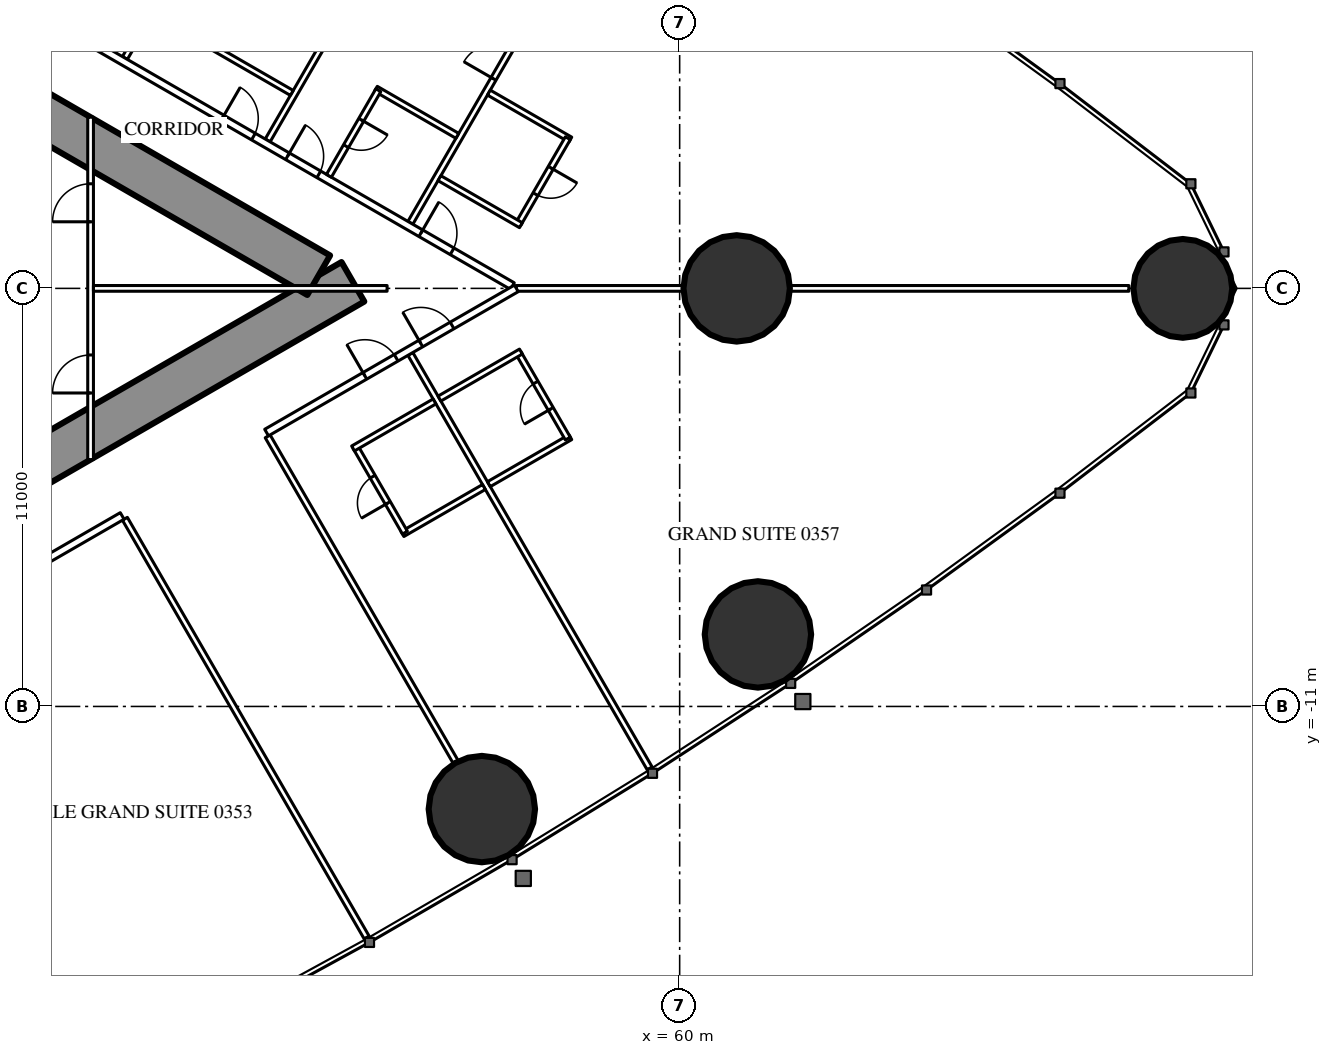
"""IFC4 building model, lengths in metres.
Left out: names, types, materials, properties, quantities, classifications, styles, units other than length and angle.
Written with IfcOpenShell. Run it as: python <this file> out.ifc"""

import sys

from ifc_helpers import new_model, si_unit, direction, frame, frame_2d, origin, origin_2d, place, context, subcontext, project, spatial, rectangle, hollow_circle, extrude, element, fill, save


model = new_model("IFC4")
c1 = context("Model", 3, precision=1e-05, world=origin(), true_north=direction((0.0, 1.0)))
c2 = subcontext(c1, "Body", "Model", "MODEL_VIEW")
j1 = project(units=[si_unit("LENGTHUNIT", "METRE"), si_unit("PLANEANGLEUNIT", "RADIAN")], contexts=[c1])
p1 = place(None, origin())
s1 = spatial("IfcSite", under=j1, at=p1, CompositionType="ELEMENT")
p2 = place(p1, origin())
s2 = spatial("IfcBuilding", under=s1, at=p2, CompositionType="ELEMENT")
p3 = place(p2, frame((0.0, 0.0, 18.0)))
s3 = spatial("IfcBuildingStorey", under=s2, at=p3, CompositionType="ELEMENT", Elevation=18.0)
p4 = place(p3, frame((73.239, 0.0, 0.0), z_axis=(0.0, 0.0, 1.0), x_axis=(1.0, 0.0, 0.0)))
e1 = element("IfcColumn", 1, at=p4, inside=s3, PredefinedType="COLUMN", context=c2, shape_type="SweptSolid", body=[
    extrude(hollow_circle(Radius=1.3, WallThickness=0.1, at=origin_2d()), origin(), (0.0, 0.0, 1.0), 3.5),
])
for number, where, z_axis, x_axis in (
    (2, (54.795, -13.701, 0.0), (0.0, 0.0, 1.0), (1.0, 0.0, 0.0)),
    (3, (62.059, -9.105, 0.0), (0.0, 0.0, 1.0), (1.0, 0.0, 0.0)),
):
    element("IfcColumn", number, at=place(p3, frame(where, z_axis=z_axis, x_axis=x_axis)), inside=s3, PredefinedType="COLUMN", context=c2, shape_type="SweptSolid", body=[
        extrude(hollow_circle(Radius=1.4, WallThickness=0.12, at=origin_2d()), origin(), (0.0, 0.0, 1.0), 3.5),
    ])
p5 = place(p3, frame((61.5, 0.0, 0.0), z_axis=(0.0, 0.0, 1.0), x_axis=(1.0, 0.0, 0.0)))
e4 = element("IfcColumn", 4, at=p5, inside=s3, PredefinedType="COLUMN", context=c2, shape_type="SweptSolid", body=[
    extrude(hollow_circle(Radius=1.4, WallThickness=0.1, at=origin_2d()), origin(), (0.0, 0.0, 1.0), 3.5),
])
p6 = place(p3, frame((27.2, -13.8, 0.0), z_axis=(0.0, 0.0, 1.0), x_axis=(0.866027159892, 0.499996958321, 0.0)))
e5 = element("IfcWall", 5, at=p6, inside=s3, PredefinedType="SHEAR", context=c2, shape_type="SweptSolid", body=[
    extrude(rectangle(XDim=27.947, YDim=1.2, at=frame_2d((13.973, 0.0))), origin(), (0.0, 0.0, 1.0), 3.5),
])
p7 = place(p6, frame((4.6, 0.0, 0.0)))
e6 = element("IfcOpeningElement", 6, at=p7, cuts=e5, PredefinedType="OPENING", context=c2, shape_type="SweptSolid", body=[
    extrude(rectangle(XDim=1.0, YDim=2.2, at=frame_2d((0.5, 1.1))), frame((0.0, 0.61, 0.0), z_axis=(0.0, -1.0, 0.0), x_axis=(1.0, 0.0, 0.0)), (0.0, 0.0, 1.0), 1.22),
])
p8 = place(p6, frame((13.395, 0.0, 0.0)))
e7 = element("IfcOpeningElement", 7, at=p8, cuts=e5, PredefinedType="OPENING", context=c2, shape_type="SweptSolid", body=[
    extrude(rectangle(XDim=1.8, YDim=2.2, at=frame_2d((0.9, 1.1))), frame((0.0, 0.61, 0.0), z_axis=(0.0, -1.0, 0.0), x_axis=(1.0, 0.0, 0.0)), (0.0, 0.0, 1.0), 1.22),
])
p9 = place(p3, frame((27.2, 13.8, 0.0), z_axis=(0.0, 0.0, 1.0), x_axis=(0.866024515034, -0.500001539357, 0.0)))
e8 = element("IfcWall", 8, at=p9, inside=s3, PredefinedType="SHEAR", context=c2, shape_type="SweptSolid", body=[
    extrude(rectangle(XDim=26.907, YDim=1.2, at=frame_2d((13.454, 0.0))), origin(), (0.0, 0.0, 1.0), 3.5),
])
p10 = place(p9, frame((4.6, 0.0, 0.0)))
e9 = element("IfcOpeningElement", 9, at=p10, cuts=e8, PredefinedType="OPENING", context=c2, shape_type="SweptSolid", body=[
    extrude(rectangle(XDim=1.0, YDim=2.2, at=frame_2d((0.5, 1.1))), frame((0.0, 0.61, 0.0), z_axis=(0.0, -1.0, 0.0), x_axis=(1.0, 0.0, 0.0)), (0.0, 0.0, 1.0), 1.22),
])
p11 = place(p9, frame((13.395, 0.0, 0.0)))
e10 = element("IfcOpeningElement", 10, at=p11, cuts=e8, PredefinedType="OPENING", context=c2, shape_type="SweptSolid", body=[
    extrude(rectangle(XDim=1.8, YDim=2.2, at=frame_2d((0.9, 1.1))), frame((0.0, 0.61, 0.0), z_axis=(0.0, -1.0, 0.0), x_axis=(1.0, 0.0, 0.0)), (0.0, 0.0, 1.0), 1.22),
])
p12 = place(p3, frame((45.403, -6.062, 0.0), z_axis=(0.0, 0.0, 1.0), x_axis=(0.500007077968, -0.866021317279, 0.0)))
e11 = element("IfcWall", 11, at=p12, inside=s3, PredefinedType="PARTITIONING", context=c2, shape_type="SweptSolid", body=[
    extrude(rectangle(XDim=12.721, YDim=0.15, at=frame_2d((6.361, 0.0))), origin(), (0.0, 0.0, 1.0), 3.25),
])
p13 = place(p3, frame((49.159, -3.893, 0.0), z_axis=(0.0, 0.0, 1.0), x_axis=(0.499998773722, -0.866026111775, 0.0)))
e12 = element("IfcWall", 12, at=p13, inside=s3, PredefinedType="PARTITIONING", context=c2, shape_type="SweptSolid", body=[
    extrude(rectangle(XDim=9.892, YDim=0.15, at=frame_2d((4.946, 0.0))), origin(), (0.0, 0.0, 1.0), 2.25),
])
p14 = place(p3, frame((52.915, -1.725, 0.0), z_axis=(0.0, 0.0, 1.0), x_axis=(0.499997163113, -0.866027041656, 0.0)))
e13 = element("IfcWall", 13, at=p14, inside=s3, PredefinedType="PARTITIONING", context=c2, shape_type="SweptSolid", body=[
    extrude(rectangle(XDim=12.591, YDim=0.15, at=frame_2d((6.295, 0.0))), origin(), (0.0, 0.0, 1.0), 3.25),
])
p15 = place(p3, frame((45.403, 6.062, 0.0), z_axis=(0.0, 0.0, 1.0), x_axis=(0.500013434677, 0.866017647131, 0.0)))
e14 = element("IfcWall", 14, at=p15, inside=s3, PredefinedType="PARTITIONING", context=c2, shape_type="SweptSolid", body=[
    extrude(rectangle(XDim=9.902, YDim=0.15, at=frame_2d((4.951, 0.0))), origin(), (0.0, 0.0, 1.0), 2.25),
])
p16 = place(p3, frame((49.159, 3.893, 0.0), z_axis=(0.0, 0.0, 1.0), x_axis=(0.499995664361, 0.866027906952, 0.0)))
e15 = element("IfcWall", 15, at=p16, inside=s3, PredefinedType="PARTITIONING", context=c2, shape_type="SweptSolid", body=[
    extrude(rectangle(XDim=12.711, YDim=0.15, at=frame_2d((6.356, 0.0))), origin(), (0.0, 0.0, 1.0), 3.25),
])
p17 = place(p3, frame((52.915, 1.725, 0.0), z_axis=(0.0, 0.0, 1.0), x_axis=(0.499997163113, 0.866027041656, 0.0)))
e16 = element("IfcWall", 16, at=p17, inside=s3, PredefinedType="PARTITIONING", context=c2, shape_type="SweptSolid", body=[
    extrude(rectangle(XDim=12.591, YDim=0.15, at=frame_2d((6.295, 0.0))), origin(), (0.0, 0.0, 1.0), 3.25),
])
p18 = place(p17, frame((4.375, 0.0, 0.0)))
e17 = element("IfcOpeningElement", 17, at=p18, cuts=e16, PredefinedType="OPENING", context=c2, shape_type="SweptSolid", body=[
    extrude(rectangle(XDim=0.9, YDim=2.2, at=frame_2d((0.45, 1.1))), frame((0.0, 0.085, 0.0), z_axis=(0.0, -1.0, 0.0), x_axis=(1.0, 0.0, 0.0)), (0.0, 0.0, 1.0), 0.17),
])
p19 = place(p3, frame((55.702, 0.0, 0.0), z_axis=(0.0, 0.0, 1.0), x_axis=(1.0, 0.0, 0.0)))
e18 = element("IfcWall", 18, at=p19, inside=s3, PredefinedType="PARTITIONING", context=c2, shape_type="SweptSolid", body=[
    extrude(rectangle(XDim=16.117, YDim=0.15, at=frame_2d((8.059, 0.0))), origin(), (0.0, 0.0, 1.0), 2.25),
])
p20 = place(p3, frame((36.834, 10.894, 0.0), z_axis=(0.0, 0.0, 1.0), x_axis=(0.866028157229, -0.499995230863, 0.0)))
e19 = element("IfcWall", 19, at=p20, inside=s3, PredefinedType="PARTITIONING", context=c2, shape_type="SweptSolid", body=[
    extrude(rectangle(XDim=21.667, YDim=0.2, at=frame_2d((10.833, 0.0))), origin(), (0.0, 0.0, 1.0), 3.25),
])
p21 = place(p20, frame((18.885, 0.0, 0.0)))
e20 = element("IfcOpeningElement", 20, at=p21, cuts=e19, PredefinedType="OPENING", context=c2, shape_type="SweptSolid", body=[
    extrude(rectangle(XDim=0.95, YDim=2.2, at=frame_2d((0.475, 1.1))), frame((0.0, 0.11, 0.0), z_axis=(0.0, -1.0, 0.0), x_axis=(1.0, 0.0, 0.0)), (0.0, 0.0, 1.0), 0.22),
])
p22 = place(p20, frame((14.835, 0.0, 0.0)))
e21 = element("IfcOpeningElement", 21, at=p22, cuts=e19, PredefinedType="OPENING", context=c2, shape_type="SweptSolid", body=[
    extrude(rectangle(XDim=0.95, YDim=2.2, at=frame_2d((0.475, 1.1))), frame((0.0, 0.11, 0.0), z_axis=(0.0, -1.0, 0.0), x_axis=(1.0, 0.0, 0.0)), (0.0, 0.0, 1.0), 0.22),
])
p23 = place(p20, frame((12.85, 0.0, 0.0)))
e22 = element("IfcOpeningElement", 22, at=p23, cuts=e19, PredefinedType="OPENING", context=c2, shape_type="SweptSolid", body=[
    extrude(rectangle(XDim=0.95, YDim=2.2, at=frame_2d((0.475, 1.1))), frame((0.0, 0.11, 0.0), z_axis=(0.0, -1.0, 0.0), x_axis=(1.0, 0.0, 0.0)), (0.0, 0.0, 1.0), 0.22),
])
p24 = place(p20, frame((1.542, 0.0, 0.0)))
e23 = element("IfcOpeningElement", 23, at=p24, cuts=e19, PredefinedType="OPENING", context=c2, shape_type="SweptSolid", body=[
    extrude(rectangle(XDim=0.95, YDim=2.2, at=frame_2d((0.475, 1.1))), frame((0.0, 0.11, 0.0), z_axis=(0.0, -1.0, 0.0), x_axis=(1.0, 0.0, 0.0)), (0.0, 0.0, 1.0), 0.22),
])
p25 = place(p3, frame((37.96, -10.243, 0.0), z_axis=(0.0, 0.0, 1.0), x_axis=(0.866024617314, 0.500001362204, 0.0)))
e24 = element("IfcWall", 24, at=p25, inside=s3, PredefinedType="PARTITIONING", context=c2, shape_type="SweptSolid", body=[
    extrude(rectangle(XDim=8.512, YDim=0.2, at=frame_2d((4.256, 0.0))), origin(), (0.0, 0.0, 1.0), 3.25),
])
p26 = place(p25, frame((3.35, 0.0, 0.0)))
e25 = element("IfcOpeningElement", 25, at=p26, cuts=e24, PredefinedType="OPENING", context=c2, shape_type="SweptSolid", body=[
    extrude(rectangle(XDim=1.0, YDim=2.2, at=frame_2d((0.5, 1.1))), frame((0.0, 0.11, 0.0), z_axis=(0.0, -1.0, 0.0), x_axis=(1.0, 0.0, 0.0)), (0.0, 0.0, 1.0), 0.22),
])
p27 = place(p3, frame((49.131, -3.794, 0.0), z_axis=(0.0, 0.0, 1.0), x_axis=(0.866030732979, 0.499990769451, 0.0)))
e26 = element("IfcWall", 26, at=p27, inside=s3, PredefinedType="PARTITIONING", context=c2, shape_type="SweptSolid", body=[
    extrude(rectangle(XDim=7.588, YDim=0.2, at=frame_2d((3.794, 0.0))), origin(), (0.0, 0.0, 1.0), 3.25),
])
p28 = place(p27, frame((2.986, 0.0, 0.0)))
e27 = element("IfcOpeningElement", 27, at=p28, cuts=e26, PredefinedType="OPENING", context=c2, shape_type="SweptSolid", body=[
    extrude(rectangle(XDim=0.95, YDim=2.2, at=frame_2d((0.475, 1.1))), frame((0.0, 0.11, 0.0), z_axis=(0.0, -1.0, 0.0), x_axis=(1.0, 0.0, 0.0)), (0.0, 0.0, 1.0), 0.22),
])
p29 = place(p27, frame((4.686, 0.0, 0.0)))
e28 = element("IfcOpeningElement", 28, at=p29, cuts=e26, PredefinedType="OPENING", context=c2, shape_type="SweptSolid", body=[
    extrude(rectangle(XDim=0.95, YDim=2.2, at=frame_2d((0.475, 1.1))), frame((0.0, 0.11, 0.0), z_axis=(0.0, -1.0, 0.0), x_axis=(1.0, 0.0, 0.0)), (0.0, 0.0, 1.0), 0.22),
])
p30 = place(p3, frame((52.706, -6.464, 0.0), z_axis=(0.0, 0.0, 1.0), x_axis=(0.86604923931, 0.499958713387, 0.0)))
e29 = element("IfcWall", 29, at=p30, inside=s3, PredefinedType="PARTITIONING", context=c2, shape_type="SweptSolid", body=[
    extrude(rectangle(XDim=2.475, YDim=0.15, at=frame_2d((1.237, 0.0))), origin(), (0.0, 0.0, 1.0), 3.25),
])
p31 = place(p3, frame((51.471, -4.175, 0.0), z_axis=(0.0, 0.0, 1.0), x_axis=(0.500006934395, -0.866021400173, 0.0)))
e30 = element("IfcWall", 30, at=p31, inside=s3, PredefinedType="PARTITIONING", context=c2, shape_type="SweptSolid", body=[
    extrude(rectangle(XDim=2.6, YDim=0.15, at=frame_2d((1.3, 0.0))), origin(), (0.0, 0.0, 1.0), 3.25),
])
p32 = place(p31, frame((0.9, 0.0, 0.0)))
e31 = element("IfcOpeningElement", 31, at=p32, cuts=e30, PredefinedType="OPENING", context=c2, shape_type="SweptSolid", body=[
    extrude(rectangle(XDim=0.8, YDim=2.2, at=frame_2d((0.4, 1.1))), frame((0.0, 0.085, 0.0), z_axis=(0.0, -1.0, 0.0), x_axis=(1.0, 0.0, 0.0)), (0.0, 0.0, 1.0), 0.17),
])
p33 = place(p3, frame((51.406, -4.212, 0.0), z_axis=(0.0, 0.0, 1.0), x_axis=(0.866031185235, 0.4999899861, 0.0)))
e32 = element("IfcWall", 32, at=p33, inside=s3, PredefinedType="PARTITIONING", context=c2, shape_type="SweptSolid", body=[
    extrude(rectangle(XDim=2.475, YDim=0.15, at=frame_2d((1.238, 0.0))), origin(), (0.0, 0.0, 1.0), 3.25),
])
p34 = place(p3, frame((54.98, -5.151, 0.0), z_axis=(0.0, 0.0, 1.0), x_axis=(0.86604923931, 0.499958713387, 0.0)))
e33 = element("IfcWall", 33, at=p34, inside=s3, PredefinedType="PARTITIONING", context=c2, shape_type="SweptSolid", body=[
    extrude(rectangle(XDim=2.475, YDim=0.15, at=frame_2d((1.237, 0.0))), origin(), (0.0, 0.0, 1.0), 3.25),
])
p35 = place(p3, frame((55.758, -1.7, 0.0), z_axis=(0.0, 0.0, 1.0), x_axis=(0.500006934395, -0.866021400173, 0.0)))
e34 = element("IfcWall", 34, at=p35, inside=s3, PredefinedType="PARTITIONING", context=c2, shape_type="SweptSolid", body=[
    extrude(rectangle(XDim=2.6, YDim=0.15, at=frame_2d((1.3, 0.0))), origin(), (0.0, 0.0, 1.0), 3.25),
])
p36 = place(p35, frame((0.9, 0.0, 0.0)))
e35 = element("IfcOpeningElement", 35, at=p36, cuts=e34, PredefinedType="OPENING", context=c2, shape_type="SweptSolid", body=[
    extrude(rectangle(XDim=0.8, YDim=2.2, at=frame_2d((0.4, 1.1))), frame((0.0, 0.085, 0.0), z_axis=(0.0, -1.0, 0.0), x_axis=(1.0, 0.0, 0.0)), (0.0, 0.0, 1.0), 0.17),
])
for number, where, z_axis, x_axis in (
    (36, (53.68, -2.9, 0.0), (0.0, 0.0, 1.0), (0.866, 0.5, 0.0)),
    (37, (54.98, 5.151, 0.0), (0.0, 0.0, 1.0), (0.866, -0.5, 0.0)),
):
    element("IfcWall", number, at=place(p3, frame(where, z_axis=z_axis, x_axis=x_axis)), inside=s3, PredefinedType="PARTITIONING", context=c2, shape_type="SweptSolid", body=[
        extrude(rectangle(XDim=2.475, YDim=0.15, at=frame_2d((1.237, 0.0))), origin(), (0.0, 0.0, 1.0), 3.25),
    ])
p37 = place(p3, frame((55.758, 1.7, 0.0), z_axis=(0.0, 0.0, 1.0), x_axis=(0.500006934395, 0.866021400173, 0.0)))
e38 = element("IfcWall", 38, at=p37, inside=s3, PredefinedType="PARTITIONING", context=c2, shape_type="SweptSolid", body=[
    extrude(rectangle(XDim=2.6, YDim=0.15, at=frame_2d((1.3, 0.0))), origin(), (0.0, 0.0, 1.0), 3.25),
])
p38 = place(p37, frame((0.9, 0.0, 0.0)))
e39 = element("IfcOpeningElement", 39, at=p38, cuts=e38, PredefinedType="OPENING", context=c2, shape_type="SweptSolid", body=[
    extrude(rectangle(XDim=0.8, YDim=2.2, at=frame_2d((0.4, 1.1))), frame((0.0, 0.085, 0.0), z_axis=(0.0, -1.0, 0.0), x_axis=(1.0, 0.0, 0.0)), (0.0, 0.0, 1.0), 0.17),
])
for number, where, z_axis, x_axis in (
    (40, (53.68, 2.9, 0.0), (0.0, 0.0, 1.0), (0.866, -0.5, 0.0)),
    (41, (52.006, 5.251, 0.0), (0.0, 0.0, 1.0), (0.866, -0.5, 0.0)),
):
    element("IfcWall", number, at=place(p3, frame(where, z_axis=z_axis, x_axis=x_axis)), inside=s3, PredefinedType="PARTITIONING", context=c2, shape_type="SweptSolid", body=[
        extrude(rectangle(XDim=2.475, YDim=0.15, at=frame_2d((1.237, 0.0))), origin(), (0.0, 0.0, 1.0), 3.25),
    ])
p39 = place(p3, frame((50.771, 2.962, 0.0), z_axis=(0.0, 0.0, 1.0), x_axis=(0.500006934395, 0.866021400173, 0.0)))
e42 = element("IfcWall", 42, at=p39, inside=s3, PredefinedType="PARTITIONING", context=c2, shape_type="SweptSolid", body=[
    extrude(rectangle(XDim=2.6, YDim=0.15, at=frame_2d((1.3, 0.0))), origin(), (0.0, 0.0, 1.0), 3.25),
])
p40 = place(p39, frame((0.9, 0.0, 0.0)))
e43 = element("IfcOpeningElement", 43, at=p40, cuts=e42, PredefinedType="OPENING", context=c2, shape_type="SweptSolid", body=[
    extrude(rectangle(XDim=0.8, YDim=2.2, at=frame_2d((0.4, 1.1))), frame((0.0, 0.085, 0.0), z_axis=(0.0, -1.0, 0.0), x_axis=(1.0, 0.0, 0.0)), (0.0, 0.0, 1.0), 0.17),
])
p41 = place(p3, frame((47.651, 6.38, 0.0), z_axis=(0.0, 0.0, 1.0), x_axis=(0.866031185235, -0.4999899861, 0.0)))
e44 = element("IfcWall", 44, at=p41, inside=s3, PredefinedType="PARTITIONING", context=c2, shape_type="SweptSolid", body=[
    extrude(rectangle(XDim=2.475, YDim=0.15, at=frame_2d((1.238, 0.0))), origin(), (0.0, 0.0, 1.0), 3.25),
])
p42 = place(p3, frame((44.5, -4.505, 0.0), z_axis=(0.0, 0.0, 1.0), x_axis=(0.0, 1.0, 0.0)))
e45 = element("IfcWall", 45, at=p42, inside=s3, PredefinedType="PARTITIONING", context=c2, shape_type="SweptSolid", body=[
    extrude(rectangle(XDim=9.009, YDim=0.15, at=frame_2d((4.505, 0.0))), origin(), (0.0, 0.0, 1.0), 2.35),
])
p43 = place(p42, frame((1.752, 0.0, 0.0)))
e46 = element("IfcOpeningElement", 46, at=p43, cuts=e45, PredefinedType="OPENING", context=c2, shape_type="SweptSolid", body=[
    extrude(rectangle(XDim=1.0, YDim=2.2, at=frame_2d((0.5, 1.1))), frame((0.0, 0.085, 0.0), z_axis=(0.0, -1.0, 0.0), x_axis=(1.0, 0.0, 0.0)), (0.0, 0.0, 1.0), 0.17),
])
p44 = place(p42, frame((6.257, 0.0, 0.0)))
e47 = element("IfcOpeningElement", 47, at=p44, cuts=e45, PredefinedType="OPENING", context=c2, shape_type="SweptSolid", body=[
    extrude(rectangle(XDim=1.0, YDim=2.2, at=frame_2d((0.5, 1.1))), frame((0.0, 0.085, 0.0), z_axis=(0.0, -1.0, 0.0), x_axis=(1.0, 0.0, 0.0)), (0.0, 0.0, 1.0), 0.17),
])
p45 = place(p3, frame((44.575, 0.0, 0.0), z_axis=(0.0, 0.0, 1.0), x_axis=(1.0, 0.0, 0.0)))
e48 = element("IfcWall", 48, at=p45, inside=s3, PredefinedType="PARTITIONING", context=c2, shape_type="SweptSolid", body=[
    extrude(rectangle(XDim=7.727, YDim=0.15, at=frame_2d((3.864, 0.0))), origin(), (0.0, 0.0, 1.0), 2.25),
])
p46 = place(p32, origin())
e49 = element("IfcDoor", 49, at=p46, inside=s3, OperationType="SINGLE_SWING_RIGHT", PredefinedType="DOOR", context=c2, shape_type="SweptSolid", body=[
    extrude(rectangle(XDim=0.8, YDim=2.2, at=frame_2d((0.4, 1.1))), frame((0.0, 0.025, 0.0), z_axis=(0.0, -1.0, 0.0), x_axis=(1.0, 0.0, 0.0)), (0.0, 0.0, 1.0), 0.05),
])
fill(e31, e49)
p47 = place(p28, origin())
e50 = element("IfcDoor", 50, at=p47, inside=s3, OperationType="SINGLE_SWING_LEFT", PredefinedType="DOOR", context=c2, shape_type="SweptSolid", body=[
    extrude(rectangle(XDim=0.95, YDim=2.2, at=frame_2d((0.475, 1.1))), frame((0.0, 0.025, 0.0), z_axis=(0.0, -1.0, 0.0), x_axis=(1.0, 0.0, 0.0)), (0.0, 0.0, 1.0), 0.05),
])
fill(e27, e50)
p48 = place(p36, origin())
e51 = element("IfcDoor", 51, at=p48, inside=s3, OperationType="SINGLE_SWING_RIGHT", PredefinedType="DOOR", context=c2, shape_type="SweptSolid", body=[
    extrude(rectangle(XDim=0.8, YDim=2.2, at=frame_2d((0.4, 1.1))), frame((0.0, 0.025, 0.0), z_axis=(0.0, -1.0, 0.0), x_axis=(1.0, 0.0, 0.0)), (0.0, 0.0, 1.0), 0.05),
])
fill(e35, e51)
p49 = place(p29, origin())
e52 = element("IfcDoor", 52, at=p49, inside=s3, OperationType="SINGLE_SWING_LEFT", PredefinedType="DOOR", context=c2, shape_type="SweptSolid", body=[
    extrude(rectangle(XDim=0.95, YDim=2.2, at=frame_2d((0.475, 1.1))), frame((0.0, 0.025, 0.0), z_axis=(0.0, -1.0, 0.0), x_axis=(1.0, 0.0, 0.0)), (0.0, 0.0, 1.0), 0.05),
])
fill(e28, e52)
p50 = place(p38, origin())
e53 = element("IfcDoor", 53, at=p50, inside=s3, OperationType="SINGLE_SWING_RIGHT", PredefinedType="DOOR", context=c2, shape_type="SweptSolid", body=[
    extrude(rectangle(XDim=0.8, YDim=2.2, at=frame_2d((0.4, 1.1))), frame((0.0, 0.025, 0.0), z_axis=(0.0, -1.0, 0.0), x_axis=(1.0, 0.0, 0.0)), (0.0, 0.0, 1.0), 0.05),
])
fill(e39, e53)
p51 = place(p21, origin())
e54 = element("IfcDoor", 54, at=p51, inside=s3, OperationType="SINGLE_SWING_LEFT", PredefinedType="DOOR", context=c2, shape_type="SweptSolid", body=[
    extrude(rectangle(XDim=0.95, YDim=2.2, at=frame_2d((0.475, 1.1))), frame((0.0, 0.025, 0.0), z_axis=(0.0, -1.0, 0.0), x_axis=(1.0, 0.0, 0.0)), (0.0, 0.0, 1.0), 0.05),
])
fill(e20, e54)
p52 = place(p40, origin())
e55 = element("IfcDoor", 55, at=p52, inside=s3, OperationType="SINGLE_SWING_RIGHT", PredefinedType="DOOR", context=c2, shape_type="SweptSolid", body=[
    extrude(rectangle(XDim=0.8, YDim=2.2, at=frame_2d((0.4, 1.1))), frame((0.0, 0.025, 0.0), z_axis=(0.0, -1.0, 0.0), x_axis=(1.0, 0.0, 0.0)), (0.0, 0.0, 1.0), 0.05),
])
fill(e43, e55)
p53 = place(p22, origin())
e56 = element("IfcDoor", 56, at=p53, inside=s3, OperationType="SINGLE_SWING_LEFT", PredefinedType="DOOR", context=c2, shape_type="SweptSolid", body=[
    extrude(rectangle(XDim=0.95, YDim=2.2, at=frame_2d((0.475, 1.1))), frame((0.0, 0.025, 0.0), z_axis=(0.0, -1.0, 0.0), x_axis=(1.0, 0.0, 0.0)), (0.0, 0.0, 1.0), 0.05),
])
fill(e21, e56)
p54 = place(p23, origin())
e57 = element("IfcDoor", 57, at=p54, inside=s3, OperationType="SINGLE_SWING_LEFT", PredefinedType="DOOR", context=c2, shape_type="SweptSolid", body=[
    extrude(rectangle(XDim=0.95, YDim=2.2, at=frame_2d((0.475, 1.1))), frame((0.0, 0.025, 0.0), z_axis=(0.0, -1.0, 0.0), x_axis=(1.0, 0.0, 0.0)), (0.0, 0.0, 1.0), 0.05),
])
fill(e22, e57)
p55 = place(p18, origin())
e58 = element("IfcDoor", 58, at=p55, inside=s3, OperationType="SINGLE_SWING_LEFT", PredefinedType="DOOR", context=c2, shape_type="SweptSolid", body=[
    extrude(rectangle(XDim=0.9, YDim=2.2, at=frame_2d((0.45, 1.1))), frame((0.0, 0.025, 0.0), z_axis=(0.0, -1.0, 0.0), x_axis=(1.0, 0.0, 0.0)), (0.0, 0.0, 1.0), 0.05),
])
fill(e17, e58)
p56 = place(p43, origin())
e59 = element("IfcDoor", 59, at=p56, inside=s3, OperationType="SINGLE_SWING_LEFT", PredefinedType="DOOR", context=c2, shape_type="SweptSolid", body=[
    extrude(rectangle(XDim=1.0, YDim=2.2, at=frame_2d((0.5, 1.1))), frame((0.0, 0.025, 0.0), z_axis=(0.0, -1.0, 0.0), x_axis=(1.0, 0.0, 0.0)), (0.0, 0.0, 1.0), 0.05),
])
fill(e46, e59)
p57 = place(p44, origin())
e60 = element("IfcDoor", 60, at=p57, inside=s3, OperationType="SINGLE_SWING_LEFT", PredefinedType="DOOR", context=c2, shape_type="SweptSolid", body=[
    extrude(rectangle(XDim=1.0, YDim=2.2, at=frame_2d((0.5, 1.1))), frame((0.0, 0.025, 0.0), z_axis=(0.0, -1.0, 0.0), x_axis=(1.0, 0.0, 0.0)), (0.0, 0.0, 1.0), 0.05),
])
fill(e47, e60)
save(model, sys.argv[1])
